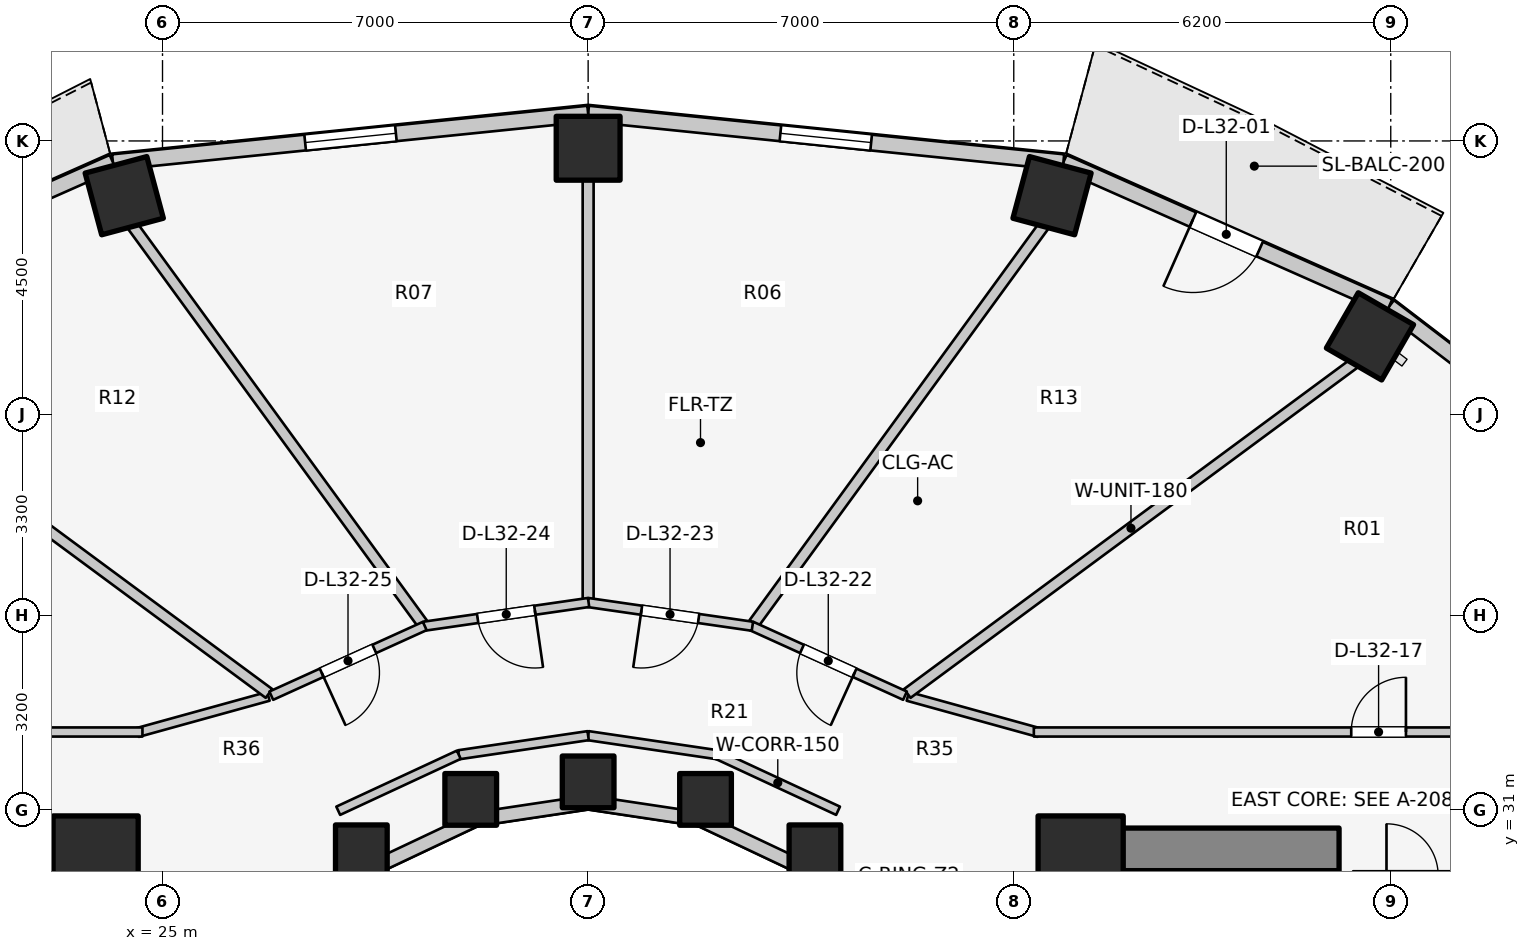
"""IFC4 building model, lengths in metres.
Left out: names, types, materials, properties, quantities, classifications, styles, units other than length and angle.
Written with IfcOpenShell. Run it as: python <this file> out.ifc"""

import sys

from ifc_helpers import new_model, si_unit, direction, frame, frame_2d, origin, origin_2d, place, context, subcontext, project, spatial, rectangle, extrude, element, fill, save


model = new_model("IFC4")
c1 = context("Model", 3, precision=1e-05, world=origin(), true_north=direction((0.0, 1.0)))
c2 = subcontext(c1, "Body", "Model", "MODEL_VIEW")
j1 = project(units=[si_unit("LENGTHUNIT", "METRE"), si_unit("PLANEANGLEUNIT", "RADIAN")], contexts=[c1])
p1 = place(None, origin())
s1 = spatial("IfcSite", under=j1, at=p1, CompositionType="ELEMENT")
p2 = place(p1, origin())
s2 = spatial("IfcBuilding", under=s1, at=p2, CompositionType="ELEMENT")
p3 = place(p2, frame((0.0, 0.0, 107.3)))
s3 = spatial("IfcBuildingStorey", under=s2, at=p3, CompositionType="ELEMENT", Elevation=107.3)
for number, where, z_axis, x_axis in (
    (1, (19.65, 30.35, 0.0), (0.0, 0.0, 1.0), (1.0, 0.0, 0.0)),
    (2, (39.85, 30.35, 0.0), (0.0, 0.0, 1.0), (1.0, 0.0, 0.0)),
):
    element("IfcWall", number, at=place(p3, frame(where, z_axis=z_axis, x_axis=x_axis)), inside=s3, PredefinedType="SHEAR", context=c2, shape_type="SweptSolid", body=[
        extrude(rectangle(XDim=4.5, YDim=0.7, at=frame_2d((2.25, 0.0))), origin(), (0.0, 0.0, 1.0), 3.1),
    ])
for number, where, z_axis, x_axis in (
    (3, (23.9, 30.2, 0.0), (0.0, 0.0, 1.0), (1.0, 0.0, 0.0)),
    (4, (40.1, 30.2, 0.0), (0.0, 0.0, 1.0), (1.0, 0.0, 0.0)),
):
    element("IfcColumn", number, at=place(p3, frame(where, z_axis=z_axis, x_axis=x_axis)), inside=s3, PredefinedType="COLUMN", context=c2, shape_type="SweptSolid", body=[
        extrude(rectangle(XDim=1.4, YDim=1.4, at=origin_2d()), origin(), (0.0, 0.0, 1.0), 3.1),
    ])
p4 = place(p3, frame((35.73, 30.327, 0.0), z_axis=(0.0, 0.0, 1.0), x_axis=(1.0, 0.0, 0.0)))
e5 = element("IfcColumn", 5, at=p4, inside=s3, PredefinedType="COLUMN", context=c2, shape_type="SweptSolid", body=[
    extrude(rectangle(XDim=0.85, YDim=0.85, at=origin_2d()), origin(), (0.0, 0.0, 1.0), 3.1),
])
p5 = place(p3, frame((44.858, 38.786, 0.0), z_axis=(0.0, 0.0, 1.0), x_axis=(0.5, 0.866025403784, 0.0)))
e6 = element("IfcColumn", 6, at=p5, inside=s3, PredefinedType="COLUMN", context=c2, shape_type="SweptSolid", body=[
    extrude(rectangle(XDim=1.05, YDim=1.05, at=origin_2d()), origin(), (0.0, 0.0, 1.0), 3.1),
])
p6 = place(p3, frame((33.931, 31.172, 0.0), z_axis=(0.0, 0.0, 1.0), x_axis=(1.0, 0.0, 0.0)))
e7 = element("IfcColumn", 7, at=p6, inside=s3, PredefinedType="COLUMN", context=c2, shape_type="SweptSolid", body=[
    extrude(rectangle(XDim=0.85, YDim=0.85, at=origin_2d()), origin(), (0.0, 0.0, 1.0), 3.1),
])
p7 = place(p3, frame((39.629, 41.1, 0.0), z_axis=(0.0, 0.0, 1.0), x_axis=(0.258819045103, 0.965925826289, 0.0)))
e8 = element("IfcColumn", 8, at=p7, inside=s3, PredefinedType="COLUMN", context=c2, shape_type="SweptSolid", body=[
    extrude(rectangle(XDim=1.05, YDim=1.05, at=origin_2d()), origin(), (0.0, 0.0, 1.0), 3.1),
])
p8 = place(p3, frame((32.0, 31.46, 0.0), z_axis=(0.0, 0.0, 1.0), x_axis=(1.0, 0.0, 0.0)))
e9 = element("IfcColumn", 9, at=p8, inside=s3, PredefinedType="COLUMN", context=c2, shape_type="SweptSolid", body=[
    extrude(rectangle(XDim=0.85, YDim=0.85, at=origin_2d()), origin(), (0.0, 0.0, 1.0), 3.1),
])
p9 = place(p3, frame((32.0, 41.88, 0.0), z_axis=(0.0, 0.0, 1.0), x_axis=(0.0, 1.0, 0.0)))
e10 = element("IfcColumn", 10, at=p9, inside=s3, PredefinedType="COLUMN", context=c2, shape_type="SweptSolid", body=[
    extrude(rectangle(XDim=1.05, YDim=1.05, at=origin_2d()), origin(), (0.0, 0.0, 1.0), 3.1),
])
p10 = place(p3, frame((30.069, 31.172, 0.0), z_axis=(0.0, 0.0, 1.0), x_axis=(1.0, 0.0, 0.0)))
e11 = element("IfcColumn", 11, at=p10, inside=s3, PredefinedType="COLUMN", context=c2, shape_type="SweptSolid", body=[
    extrude(rectangle(XDim=0.85, YDim=0.85, at=origin_2d()), origin(), (0.0, 0.0, 1.0), 3.1),
])
p11 = place(p3, frame((24.371, 41.1, 0.0), z_axis=(0.0, 0.0, 1.0), x_axis=(-0.258819045103, 0.965925826289, 0.0)))
e12 = element("IfcColumn", 12, at=p11, inside=s3, PredefinedType="COLUMN", context=c2, shape_type="SweptSolid", body=[
    extrude(rectangle(XDim=1.05, YDim=1.05, at=origin_2d()), origin(), (0.0, 0.0, 1.0), 3.1),
])
p12 = place(p3, frame((28.27, 30.327, 0.0), z_axis=(0.0, 0.0, 1.0), x_axis=(1.0, 0.0, 0.0)))
e13 = element("IfcColumn", 13, at=p12, inside=s3, PredefinedType="COLUMN", context=c2, shape_type="SweptSolid", body=[
    extrude(rectangle(XDim=0.85, YDim=0.85, at=origin_2d()), origin(), (0.0, 0.0, 1.0), 3.1),
])
p13 = place(p3, frame((37.035, 28.742, 0.0), z_axis=(0.0, 0.0, 1.0), x_axis=(-0.752576694707, 0.658504607869, 0.0)))
e14 = element("IfcWall", 14, at=p13, inside=s3, PredefinedType="STANDARD", context=c2, shape_type="SweptSolid", body=[
    extrude(rectangle(XDim=1.959, YDim=0.23, at=frame_2d((0.98, 0.0))), origin(), (0.0, 0.0, 1.0), 2.16),
])
p14 = place(p3, frame((35.56, 30.032, 0.0), z_axis=(0.0, 0.0, 1.0), x_axis=(-0.904179699603, 0.427152280606, 0.0)))
e15 = element("IfcWall", 15, at=p14, inside=s3, PredefinedType="STANDARD", context=c2, shape_type="SweptSolid", body=[
    extrude(rectangle(XDim=1.899, YDim=0.23, at=frame_2d((0.95, 0.0))), origin(), (0.0, 0.0, 1.0), 2.16),
])
for number, where, z_axis, x_axis in (
    (16, (33.843, 30.843, 0.0), (0.0, 0.0, 1.0), (-0.989, 0.149, 0.0)),
    (17, (32.0, 31.12, 0.0), (0.0, 0.0, 1.0), (-0.989, -0.149, 0.0)),
):
    element("IfcWall", number, at=place(p3, frame(where, z_axis=z_axis, x_axis=x_axis)), inside=s3, PredefinedType="STANDARD", context=c2, shape_type="SweptSolid", body=[
        extrude(rectangle(XDim=1.864, YDim=0.23, at=frame_2d((0.932, 0.0))), origin(), (0.0, 0.0, 1.0), 2.16),
    ])
p15 = place(p3, frame((30.157, 30.843, 0.0), z_axis=(0.0, 0.0, 1.0), x_axis=(-0.904179699603, -0.427152280606, 0.0)))
e18 = element("IfcWall", 18, at=p15, inside=s3, PredefinedType="STANDARD", context=c2, shape_type="SweptSolid", body=[
    extrude(rectangle(XDim=1.899, YDim=0.23, at=frame_2d((0.95, 0.0))), origin(), (0.0, 0.0, 1.0), 2.16),
])
p16 = place(p3, frame((28.44, 30.032, 0.0), z_axis=(0.0, 0.0, 1.0), x_axis=(-0.752576694707, -0.658504607869, 0.0)))
e19 = element("IfcWall", 19, at=p16, inside=s3, PredefinedType="STANDARD", context=c2, shape_type="SweptSolid", body=[
    extrude(rectangle(XDim=1.959, YDim=0.23, at=frame_2d((0.98, 0.0))), origin(), (0.0, 0.0, 1.0), 2.16),
])
p17 = place(p3, frame((49.266, 36.153, 0.0), z_axis=(0.0, 0.0, 1.0), x_axis=(-0.794809810864, 0.606858603427, 0.0)))
e20 = element("IfcWall", 20, at=p17, inside=s3, PredefinedType="STANDARD", context=c2, shape_type="SweptSolid", body=[
    extrude(rectangle(XDim=5.149, YDim=0.26, at=frame_2d((2.575, 0.0))), origin(), (0.0, 0.0, 1.0), 2.85),
])
p18 = place(p3, frame((45.173, 39.278, 0.0), z_axis=(0.0, 0.0, 1.0), x_axis=(-0.914336605747, 0.404955023911, 0.0)))
e21 = element("IfcWall", 21, at=p18, inside=s3, PredefinedType="STANDARD", context=c2, shape_type="SweptSolid", body=[
    extrude(rectangle(XDim=5.859, YDim=0.26, at=frame_2d((2.929, 0.0))), origin(), (0.0, 0.0, 1.0), 2.88),
])
p19 = place(p18, frame((2.329, 0.0, 0.0)))
e22 = element("IfcOpeningElement", 22, at=p19, cuts=e21, PredefinedType="OPENING", context=c2, shape_type="SweptSolid", body=[
    extrude(rectangle(XDim=1.2, YDim=2.2, at=frame_2d((0.6, 1.1))), frame((0.0, 0.14, 0.0), z_axis=(0.0, -1.0, 0.0), x_axis=(1.0, 0.0, 0.0)), (0.0, 0.0, 1.0), 0.28),
])
p20 = place(p3, frame((39.816, 41.651, 0.0), z_axis=(0.0, 0.0, 1.0), x_axis=(-0.994821390558, 0.101638579726, 0.0)))
e23 = element("IfcWall", 23, at=p20, inside=s3, PredefinedType="STANDARD", context=c2, shape_type="SweptSolid", body=[
    extrude(rectangle(XDim=7.857, YDim=0.26, at=frame_2d((3.929, 0.0))), origin(), (0.0, 0.0, 1.0), 2.85),
])
p21 = place(p20, frame((3.178, 0.0, 0.75)))
e24 = element("IfcOpeningElement", 24, at=p21, cuts=e23, PredefinedType="OPENING", context=c2, shape_type="SweptSolid", body=[
    extrude(rectangle(XDim=1.5, YDim=1.6, at=frame_2d((0.75, 0.8))), frame((0.0, 0.14, 0.0), z_axis=(0.0, -1.0, 0.0), x_axis=(1.0, 0.0, 0.0)), (0.0, 0.0, 1.0), 0.28),
])
p22 = place(p3, frame((32.0, 42.449, 0.0), z_axis=(0.0, 0.0, 1.0), x_axis=(-0.994821390558, -0.101638579726, 0.0)))
e25 = element("IfcWall", 25, at=p22, inside=s3, PredefinedType="STANDARD", context=c2, shape_type="SweptSolid", body=[
    extrude(rectangle(XDim=7.857, YDim=0.26, at=frame_2d((3.929, 0.0))), origin(), (0.0, 0.0, 1.0), 2.85),
])
p23 = place(p22, frame((3.178, 0.0, 0.75)))
e26 = element("IfcOpeningElement", 26, at=p23, cuts=e25, PredefinedType="OPENING", context=c2, shape_type="SweptSolid", body=[
    extrude(rectangle(XDim=1.5, YDim=1.6, at=frame_2d((0.75, 0.8))), frame((0.0, 0.14, 0.0), z_axis=(0.0, -1.0, 0.0), x_axis=(1.0, 0.0, 0.0)), (0.0, 0.0, 1.0), 0.28),
])
p24 = place(p3, frame((24.184, 41.651, 0.0), z_axis=(0.0, 0.0, 1.0), x_axis=(-0.914336605747, -0.404955023911, 0.0)))
e27 = element("IfcWall", 27, at=p24, inside=s3, PredefinedType="STANDARD", context=c2, shape_type="SweptSolid", body=[
    extrude(rectangle(XDim=5.859, YDim=0.26, at=frame_2d((2.929, 0.0))), origin(), (0.0, 0.0, 1.0), 2.88),
])
p25 = place(p24, frame((2.329, 0.0, 0.0)))
e28 = element("IfcOpeningElement", 28, at=p25, cuts=e27, PredefinedType="OPENING", context=c2, shape_type="SweptSolid", body=[
    extrude(rectangle(XDim=1.2, YDim=2.2, at=frame_2d((0.6, 1.1))), frame((0.0, 0.14, 0.0), z_axis=(0.0, -1.0, 0.0), x_axis=(1.0, 0.0, 0.0)), (0.0, 0.0, 1.0), 0.28),
])
p26 = place(p3, frame((36.11, 30.985, 0.0), z_axis=(0.0, 0.0, 1.0), x_axis=(-0.906943449489, 0.421252393975, 0.0)))
e29 = element("IfcWall", 29, at=p26, inside=s3, PredefinedType="PARTITIONING", context=c2, shape_type="SweptSolid", body=[
    extrude(rectangle(XDim=2.186, YDim=0.15, at=frame_2d((1.093, 0.0))), origin(), (0.0, 0.0, 1.0), 2.272),
])
for number, where, z_axis, x_axis in (
    (30, (34.127, 31.906, 0.0), (0.0, 0.0, 1.0), (-0.989, 0.146, 0.0)),
    (31, (32.0, 32.22, 0.0), (0.0, 0.0, 1.0), (-0.989, -0.146, 0.0)),
):
    element("IfcWall", number, at=place(p3, frame(where, z_axis=z_axis, x_axis=x_axis)), inside=s3, PredefinedType="PARTITIONING", context=c2, shape_type="SweptSolid", body=[
        extrude(rectangle(XDim=2.151, YDim=0.15, at=frame_2d((1.075, 0.0))), origin(), (0.0, 0.0, 1.0), 2.272),
    ])
p27 = place(p3, frame((29.873, 31.906, 0.0), z_axis=(0.0, 0.0, 1.0), x_axis=(-0.906943449489, -0.421252393975, 0.0)))
e32 = element("IfcWall", 32, at=p27, inside=s3, PredefinedType="PARTITIONING", context=c2, shape_type="SweptSolid", body=[
    extrude(rectangle(XDim=2.186, YDim=0.15, at=frame_2d((1.093, 0.0))), origin(), (0.0, 0.0, 1.0), 2.272),
])
p28 = place(p3, frame((37.258, 32.867, 0.0), z_axis=(0.0, 0.0, 1.0), x_axis=(0.963833843713, -0.266503886865, 0.0)))
e33 = element("IfcWall", 33, at=p28, inside=s3, PredefinedType="PARTITIONING", context=c2, shape_type="SweptSolid", body=[
    extrude(rectangle(XDim=2.232, YDim=0.15, at=frame_2d((1.116, 0.0))), origin(), (0.0, 0.0, 1.0), 2.272),
])
p29 = place(p3, frame((39.33, 32.28, 0.0), z_axis=(0.0, 0.0, 1.0), x_axis=(1.0, 0.0, 0.0)))
e34 = element("IfcWall", 34, at=p29, inside=s3, PredefinedType="PARTITIONING", context=c2, shape_type="SweptSolid", body=[
    extrude(rectangle(XDim=7.52, YDim=0.15, at=frame_2d((3.76, 0.0))), origin(), (0.0, 0.0, 1.0), 2.272),
])
p30 = place(p29, frame((5.22, 0.0, 0.0)))
e35 = element("IfcOpeningElement", 35, at=p30, cuts=e34, PredefinedType="OPENING", context=c2, shape_type="SweptSolid", body=[
    extrude(rectangle(XDim=0.9, YDim=2.1, at=frame_2d((0.45, 1.05))), frame((0.0, 0.085, 0.0), z_axis=(0.0, -1.0, 0.0), x_axis=(1.0, 0.0, 0.0)), (0.0, 0.0, 1.0), 0.17),
])
p31 = place(p3, frame((26.742, 32.867, 0.0), z_axis=(0.0, 0.0, 1.0), x_axis=(-0.963833843713, -0.266503886865, 0.0)))
e36 = element("IfcWall", 36, at=p31, inside=s3, PredefinedType="PARTITIONING", context=c2, shape_type="SweptSolid", body=[
    extrude(rectangle(XDim=2.232, YDim=0.15, at=frame_2d((1.116, 0.0))), origin(), (0.0, 0.0, 1.0), 2.272),
])
p32 = place(p3, frame((17.15, 32.28, 0.0), z_axis=(0.0, 0.0, 1.0), x_axis=(1.0, 0.0, 0.0)))
e37 = element("IfcWall", 37, at=p32, inside=s3, PredefinedType="PARTITIONING", context=c2, shape_type="SweptSolid", body=[
    extrude(rectangle(XDim=7.52, YDim=0.15, at=frame_2d((3.76, 0.0))), origin(), (0.0, 0.0, 1.0), 2.272),
])
p33 = place(p32, frame((1.3, 0.0, 0.0)))
e38 = element("IfcOpeningElement", 38, at=p33, cuts=e37, PredefinedType="OPENING", context=c2, shape_type="SweptSolid", body=[
    extrude(rectangle(XDim=0.9, YDim=2.1, at=frame_2d((0.45, 1.05))), frame((0.0, 0.085, 0.0), z_axis=(0.0, -1.0, 0.0), x_axis=(1.0, 0.0, 0.0)), (0.0, 0.0, 1.0), 0.17),
])
p34 = place(p3, frame((37.249, 32.914, 0.0), z_axis=(0.0, 0.0, 1.0), x_axis=(0.80430981394, 0.594210167533, 0.0)))
e39 = element("IfcWall", 39, at=p34, inside=s3, PredefinedType="PARTITIONING", context=c2, shape_type="SweptSolid", body=[
    extrude(rectangle(XDim=9.146, YDim=0.18, at=frame_2d((4.573, 0.0))), origin(), (0.0, 0.0, 1.0), 2.272),
])
p35 = place(p3, frame((34.727, 34.066, 0.0), z_axis=(0.0, 0.0, 1.0), x_axis=(0.589042211476, 0.808102266486, 0.0)))
e40 = element("IfcWall", 40, at=p35, inside=s3, PredefinedType="PARTITIONING", context=c2, shape_type="SweptSolid", body=[
    extrude(rectangle(XDim=8.101, YDim=0.18, at=frame_2d((4.051, 0.0))), origin(), (0.0, 0.0, 1.0), 2.272),
])
p36 = place(p3, frame((32.0, 34.465, 0.0), z_axis=(0.0, 0.0, 1.0), x_axis=(0.0, 1.0, 0.0)))
e41 = element("IfcWall", 41, at=p36, inside=s3, PredefinedType="PARTITIONING", context=c2, shape_type="SweptSolid", body=[
    extrude(rectangle(XDim=6.91, YDim=0.18, at=frame_2d((3.455, 0.0))), origin(), (0.0, 0.0, 1.0), 2.272),
])
p37 = place(p3, frame((29.273, 34.066, 0.0), z_axis=(0.0, 0.0, 1.0), x_axis=(-0.589042211476, 0.808102266486, 0.0)))
e42 = element("IfcWall", 42, at=p37, inside=s3, PredefinedType="PARTITIONING", context=c2, shape_type="SweptSolid", body=[
    extrude(rectangle(XDim=8.101, YDim=0.18, at=frame_2d((4.051, 0.0))), origin(), (0.0, 0.0, 1.0), 2.272),
])
p38 = place(p3, frame((26.751, 32.914, 0.0), z_axis=(0.0, 0.0, 1.0), x_axis=(-0.80430981394, 0.594210167533, 0.0)))
e43 = element("IfcWall", 43, at=p38, inside=s3, PredefinedType="PARTITIONING", context=c2, shape_type="SweptSolid", body=[
    extrude(rectangle(XDim=9.146, YDim=0.18, at=frame_2d((4.573, 0.0))), origin(), (0.0, 0.0, 1.0), 2.272),
])
p39 = place(p3, frame((37.211, 32.877, 0.0), z_axis=(0.0, 0.0, 1.0), x_axis=(-0.910568469686, 0.41335827319, 0.0)))
e44 = element("IfcWall", 44, at=p39, inside=s3, PredefinedType="PARTITIONING", context=c2, shape_type="SweptSolid", body=[
    extrude(rectangle(XDim=2.772, YDim=0.15, at=frame_2d((1.386, 0.0))), origin(), (0.0, 0.0, 1.0), 2.272),
])
p40 = place(p39, frame((0.911, 0.0, 0.0)))
e45 = element("IfcOpeningElement", 45, at=p40, cuts=e44, PredefinedType="OPENING", context=c2, shape_type="SweptSolid", body=[
    extrude(rectangle(XDim=0.95, YDim=2.1, at=frame_2d((0.475, 1.05))), frame((0.0, 0.085, 0.0), z_axis=(0.0, -1.0, 0.0), x_axis=(1.0, 0.0, 0.0)), (0.0, 0.0, 1.0), 0.17),
])
p41 = place(p3, frame((34.701, 34.019, 0.0), z_axis=(0.0, 0.0, 1.0), x_axis=(-0.989748682384, 0.142819976611, 0.0)))
e46 = element("IfcWall", 46, at=p41, inside=s3, PredefinedType="PARTITIONING", context=c2, shape_type="SweptSolid", body=[
    extrude(rectangle(XDim=2.737, YDim=0.15, at=frame_2d((1.368, 0.0))), origin(), (0.0, 0.0, 1.0), 2.272),
])
p42 = place(p41, frame((0.893, 0.0, 0.0)))
e47 = element("IfcOpeningElement", 47, at=p42, cuts=e46, PredefinedType="OPENING", context=c2, shape_type="SweptSolid", body=[
    extrude(rectangle(XDim=0.95, YDim=2.1, at=frame_2d((0.475, 1.05))), frame((0.0, 0.085, 0.0), z_axis=(0.0, -1.0, 0.0), x_axis=(1.0, 0.0, 0.0)), (0.0, 0.0, 1.0), 0.17),
])
p43 = place(p3, frame((32.007, 34.41, 0.0), z_axis=(0.0, 0.0, 1.0), x_axis=(-0.989748682384, -0.142819976611, 0.0)))
e48 = element("IfcWall", 48, at=p43, inside=s3, PredefinedType="PARTITIONING", context=c2, shape_type="SweptSolid", body=[
    extrude(rectangle(XDim=2.737, YDim=0.15, at=frame_2d((1.368, 0.0))), origin(), (0.0, 0.0, 1.0), 2.272),
])
p44 = place(p43, frame((0.893, 0.0, 0.0)))
e49 = element("IfcOpeningElement", 49, at=p44, cuts=e48, PredefinedType="OPENING", context=c2, shape_type="SweptSolid", body=[
    extrude(rectangle(XDim=0.95, YDim=2.1, at=frame_2d((0.475, 1.05))), frame((0.0, 0.085, 0.0), z_axis=(0.0, -1.0, 0.0), x_axis=(1.0, 0.0, 0.0)), (0.0, 0.0, 1.0), 0.17),
])
p45 = place(p3, frame((29.313, 34.023, 0.0), z_axis=(0.0, 0.0, 1.0), x_axis=(-0.910568469686, -0.41335827319, 0.0)))
e50 = element("IfcWall", 50, at=p45, inside=s3, PredefinedType="PARTITIONING", context=c2, shape_type="SweptSolid", body=[
    extrude(rectangle(XDim=2.772, YDim=0.15, at=frame_2d((1.386, 0.0))), origin(), (0.0, 0.0, 1.0), 2.272),
])
p46 = place(p45, frame((0.911, 0.0, 0.0)))
e51 = element("IfcOpeningElement", 51, at=p46, cuts=e50, PredefinedType="OPENING", context=c2, shape_type="SweptSolid", body=[
    extrude(rectangle(XDim=0.95, YDim=2.1, at=frame_2d((0.475, 1.05))), frame((0.0, 0.085, 0.0), z_axis=(0.0, -1.0, 0.0), x_axis=(1.0, 0.0, 0.0)), (0.0, 0.0, 1.0), 0.17),
])
p47 = place(p19, origin())
e52 = element("IfcDoor", 52, at=p47, inside=s3, OperationType="SINGLE_SWING_RIGHT", PredefinedType="DOOR", context=c2, shape_type="SweptSolid", body=[
    extrude(rectangle(XDim=1.2, YDim=2.2, at=frame_2d((0.6, 1.1))), frame((0.0, 0.025, 0.0), z_axis=(0.0, -1.0, 0.0), x_axis=(1.0, 0.0, 0.0)), (0.0, 0.0, 1.0), 0.05),
])
fill(e22, e52)
p48 = place(p21, origin())
e53 = element("IfcWindow", 53, at=p48, inside=s3, PartitioningType="SINGLE_PANEL", PredefinedType="WINDOW", context=c2, shape_type="SweptSolid", body=[
    extrude(rectangle(XDim=1.5, YDim=1.6, at=frame_2d((0.75, 0.8))), frame((0.0, 0.03, 0.0), z_axis=(0.0, -1.0, 0.0), x_axis=(1.0, 0.0, 0.0)), (0.0, 0.0, 1.0), 0.06),
])
fill(e24, e53)
p49 = place(p23, origin())
e54 = element("IfcWindow", 54, at=p49, inside=s3, PartitioningType="SINGLE_PANEL", PredefinedType="WINDOW", context=c2, shape_type="SweptSolid", body=[
    extrude(rectangle(XDim=1.5, YDim=1.6, at=frame_2d((0.75, 0.8))), frame((0.0, 0.03, 0.0), z_axis=(0.0, -1.0, 0.0), x_axis=(1.0, 0.0, 0.0)), (0.0, 0.0, 1.0), 0.06),
])
fill(e26, e54)
p50 = place(p30, origin())
e55 = element("IfcDoor", 55, at=p50, inside=s3, OperationType="SINGLE_SWING_RIGHT", PredefinedType="DOOR", context=c2, shape_type="SweptSolid", body=[
    extrude(rectangle(XDim=0.9, YDim=2.1, at=frame_2d((0.45, 1.05))), frame((0.0, 0.025, 0.0), z_axis=(0.0, -1.0, 0.0), x_axis=(1.0, 0.0, 0.0)), (0.0, 0.0, 1.0), 0.05),
])
fill(e35, e55)
p51 = place(p40, origin())
e56 = element("IfcDoor", 56, at=p51, inside=s3, OperationType="SINGLE_SWING_LEFT", PredefinedType="DOOR", context=c2, shape_type="SweptSolid", body=[
    extrude(rectangle(XDim=0.95, YDim=2.1, at=frame_2d((0.475, 1.05))), frame((0.0, 0.025, 0.0), z_axis=(0.0, -1.0, 0.0), x_axis=(1.0, 0.0, 0.0)), (0.0, 0.0, 1.0), 0.05),
])
fill(e45, e56)
p52 = place(p42, origin())
e57 = element("IfcDoor", 57, at=p52, inside=s3, OperationType="SINGLE_SWING_RIGHT", PredefinedType="DOOR", context=c2, shape_type="SweptSolid", body=[
    extrude(rectangle(XDim=0.95, YDim=2.1, at=frame_2d((0.475, 1.05))), frame((0.0, 0.025, 0.0), z_axis=(0.0, -1.0, 0.0), x_axis=(1.0, 0.0, 0.0)), (0.0, 0.0, 1.0), 0.05),
])
fill(e47, e57)
p53 = place(p44, origin())
e58 = element("IfcDoor", 58, at=p53, inside=s3, OperationType="SINGLE_SWING_LEFT", PredefinedType="DOOR", context=c2, shape_type="SweptSolid", body=[
    extrude(rectangle(XDim=0.95, YDim=2.1, at=frame_2d((0.475, 1.05))), frame((0.0, 0.025, 0.0), z_axis=(0.0, -1.0, 0.0), x_axis=(1.0, 0.0, 0.0)), (0.0, 0.0, 1.0), 0.05),
])
fill(e49, e58)
p54 = place(p46, origin())
e59 = element("IfcDoor", 59, at=p54, inside=s3, OperationType="SINGLE_SWING_RIGHT", PredefinedType="DOOR", context=c2, shape_type="SweptSolid", body=[
    extrude(rectangle(XDim=0.95, YDim=2.1, at=frame_2d((0.475, 1.05))), frame((0.0, 0.025, 0.0), z_axis=(0.0, -1.0, 0.0), x_axis=(1.0, 0.0, 0.0)), (0.0, 0.0, 1.0), 0.05),
])
fill(e51, e59)
save(model, sys.argv[1])
